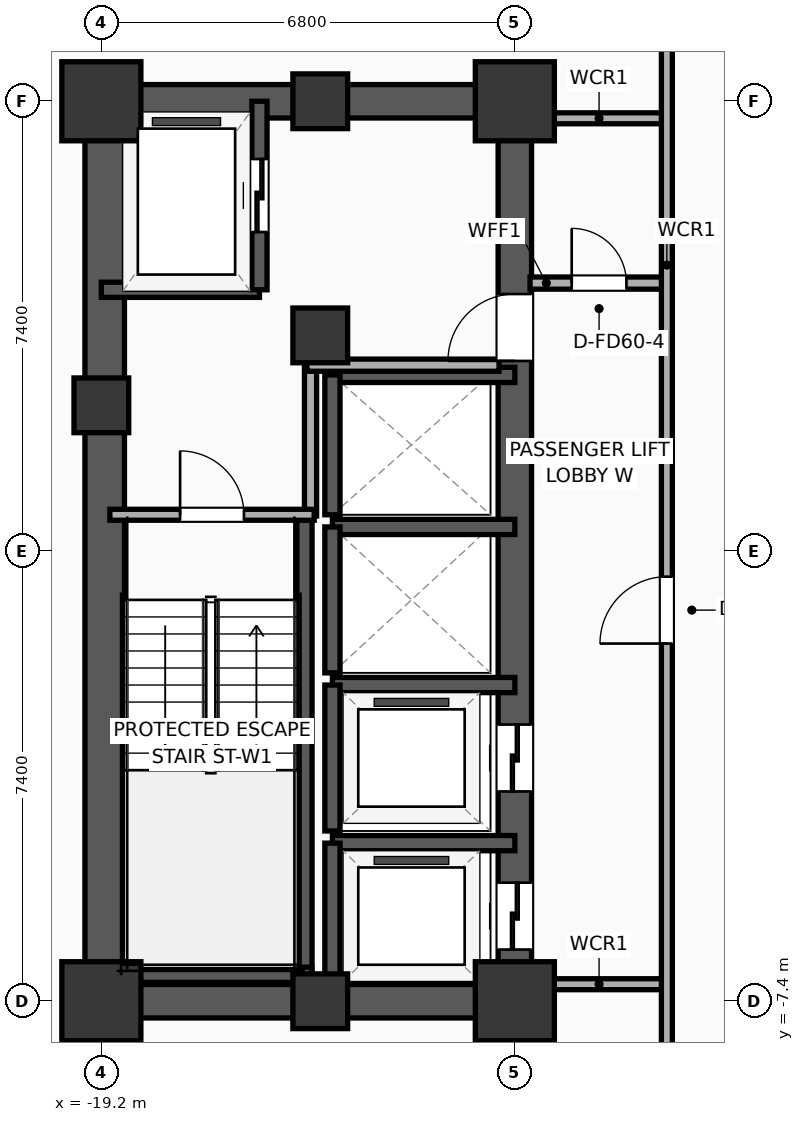
"""IFC4 building model, lengths in metres.
Left out: names, types, materials, properties, quantities, classifications, styles, units other than length and angle.
Written with IfcOpenShell. Run it as: python <this file> out.ifc"""

import sys

from ifc_helpers import new_model, si_unit, direction, frame, frame_2d, origin, origin_2d, place, context, subcontext, project, spatial, rectangle, extrude, element, fill, save


model = new_model("IFC4")
c1 = context("Model", 3, precision=1e-05, world=origin(), true_north=direction((0.0, 1.0)))
c2 = subcontext(c1, "Body", "Model", "MODEL_VIEW")
j1 = project(units=[si_unit("LENGTHUNIT", "METRE"), si_unit("PLANEANGLEUNIT", "RADIAN")], contexts=[c1])
p1 = place(None, origin())
s1 = spatial("IfcSite", under=j1, at=p1, CompositionType="ELEMENT")
p2 = place(p1, origin())
s2 = spatial("IfcBuilding", under=s1, at=p2, CompositionType="ELEMENT")
p3 = place(p2, frame((0.0, 0.0, 120.9)))
s3 = spatial("IfcBuildingStorey", under=s2, at=p3, CompositionType="ELEMENT", Elevation=120.9)
p4 = place(p3, frame((-19.2, -7.4, 0.0), z_axis=(0.0, 0.0, 1.0), x_axis=(1.0, 0.0, 0.0)))
e1 = element("IfcColumn", 1, at=p4, inside=s3, PredefinedType="COLUMN", context=c2, shape_type="SweptSolid", body=[
    extrude(rectangle(XDim=1.3, YDim=1.3, at=origin_2d()), origin(), (0.0, 0.0, 1.0), 3.9),
])
p5 = place(p3, frame((-19.2, 2.4, 0.0), z_axis=(0.0, 0.0, 1.0), x_axis=(1.0, 0.0, 0.0)))
e2 = element("IfcColumn", 2, at=p5, inside=s3, PredefinedType="COLUMN", context=c2, shape_type="SweptSolid", body=[
    extrude(rectangle(XDim=0.9, YDim=0.9, at=origin_2d()), origin(), (0.0, 0.0, 1.0), 3.9),
])
p6 = place(p3, frame((-19.2, 7.4, 0.0), z_axis=(0.0, 0.0, 1.0), x_axis=(1.0, 0.0, 0.0)))
e3 = element("IfcColumn", 3, at=p6, inside=s3, PredefinedType="COLUMN", context=c2, shape_type="SweptSolid", body=[
    extrude(rectangle(XDim=1.3, YDim=1.3, at=origin_2d()), origin(), (0.0, 0.0, 1.0), 3.9),
])
for number, where, z_axis, x_axis in (
    (4, (-15.6, -7.4, 0.0), (0.0, 0.0, 1.0), (1.0, 0.0, 0.0)),
    (5, (-15.6, 7.4, 0.0), (0.0, 0.0, 1.0), (1.0, 0.0, 0.0)),
):
    element("IfcColumn", number, at=place(p3, frame(where, z_axis=z_axis, x_axis=x_axis)), inside=s3, PredefinedType="COLUMN", context=c2, shape_type="SweptSolid", body=[
        extrude(rectangle(XDim=0.9, YDim=0.9, at=origin_2d()), origin(), (0.0, 0.0, 1.0), 3.9),
    ])
p7 = place(p3, frame((-12.4, -7.4, 0.0), z_axis=(0.0, 0.0, 1.0), x_axis=(1.0, 0.0, 0.0)))
e6 = element("IfcColumn", 6, at=p7, inside=s3, PredefinedType="COLUMN", context=c2, shape_type="SweptSolid", body=[
    extrude(rectangle(XDim=1.3, YDim=1.3, at=origin_2d()), origin(), (0.0, 0.0, 1.0), 3.9),
])
p8 = place(p3, frame((-15.6, 3.55, 0.0), z_axis=(0.0, 0.0, 1.0), x_axis=(1.0, 0.0, 0.0)))
e7 = element("IfcColumn", 7, at=p8, inside=s3, PredefinedType="COLUMN", context=c2, shape_type="SweptSolid", body=[
    extrude(rectangle(XDim=0.9, YDim=0.9, at=origin_2d()), origin(), (0.0, 0.0, 1.0), 3.9),
])
p9 = place(p3, frame((-12.4, 7.4, 0.0), z_axis=(0.0, 0.0, 1.0), x_axis=(1.0, 0.0, 0.0)))
e8 = element("IfcColumn", 8, at=p9, inside=s3, PredefinedType="COLUMN", context=c2, shape_type="SweptSolid", body=[
    extrude(rectangle(XDim=1.3, YDim=1.3, at=origin_2d()), origin(), (0.0, 0.0, 1.0), 3.9),
])
for number, where, z_axis, x_axis in (
    (9, (-19.475, -7.4, 0.0), (0.0, 0.0, 1.0), (1.0, 0.0, 0.0)),
    (10, (-19.475, 7.4, 0.0), (0.0, 0.0, 1.0), (1.0, 0.0, 0.0)),
):
    element("IfcWall", number, at=place(p3, frame(where, z_axis=z_axis, x_axis=x_axis)), inside=s3, PredefinedType="SHEAR", context=c2, shape_type="SweptSolid", body=[
        extrude(rectangle(XDim=7.35, YDim=0.55, at=frame_2d((3.675, 0.0))), origin(), (0.0, 0.0, 1.0), 3.65),
    ])
p10 = place(p3, frame((-19.145, -7.4, 0.0), z_axis=(0.0, 0.0, 1.0), x_axis=(0.0, 1.0, 0.0)))
e11 = element("IfcWall", 11, at=p10, inside=s3, PredefinedType="SHEAR", context=c2, shape_type="SweptSolid", body=[
    extrude(rectangle(XDim=14.8, YDim=0.65, at=frame_2d((7.4, 0.0))), origin(), (0.0, 0.0, 1.0), 3.65),
])
p11 = place(p3, frame((-12.4, -7.4, 0.0), z_axis=(0.0, 0.0, 1.0), x_axis=(0.0, 1.0, 0.0)))
e12 = element("IfcWall", 12, at=p11, inside=s3, PredefinedType="SHEAR", context=c2, shape_type="SweptSolid", body=[
    extrude(rectangle(XDim=14.8, YDim=0.55, at=frame_2d((7.4, 0.0))), origin(), (0.0, 0.0, 1.0), 3.65),
])
p12 = place(p11, frame((0.85, 0.0, 0.0)))
e13 = element("IfcOpeningElement", 13, at=p12, cuts=e12, PredefinedType="OPENING", context=c2, shape_type="SweptSolid", body=[
    extrude(rectangle(XDim=1.1, YDim=2.05, at=frame_2d((0.55, 1.025))), frame((0.0, 0.285, 0.0), z_axis=(0.0, -1.0, 0.0), x_axis=(1.0, 0.0, 0.0)), (0.0, 0.0, 1.0), 0.57),
])
p13 = place(p11, frame((3.45, 0.0, 0.0)))
e14 = element("IfcOpeningElement", 14, at=p13, cuts=e12, PredefinedType="OPENING", context=c2, shape_type="SweptSolid", body=[
    extrude(rectangle(XDim=1.1, YDim=2.05, at=frame_2d((0.55, 1.025))), frame((0.0, 0.285, 0.0), z_axis=(0.0, -1.0, 0.0), x_axis=(1.0, 0.0, 0.0)), (0.0, 0.0, 1.0), 0.57),
])
p14 = place(p11, frame((10.53, 0.0, 0.0)))
e15 = element("IfcOpeningElement", 15, at=p14, cuts=e12, PredefinedType="OPENING", context=c2, shape_type="SweptSolid", body=[
    extrude(rectangle(XDim=1.1, YDim=2.05, at=frame_2d((0.55, 1.025))), frame((0.0, 0.285, 0.0), z_axis=(0.0, -1.0, 0.0), x_axis=(1.0, 0.0, 0.0)), (0.0, 0.0, 1.0), 0.57),
])
p15 = place(p3, frame((-15.86, -7.085, 0.0), z_axis=(0.0, 0.0, 1.0), x_axis=(0.0, 1.0, 0.0)))
e16 = element("IfcWall", 16, at=p15, inside=s3, PredefinedType="SOLIDWALL", context=c2, shape_type="SweptSolid", body=[
    extrude(rectangle(XDim=7.685, YDim=0.25, at=frame_2d((3.843, 0.0))), origin(), (0.0, 0.0, 1.0), 3.65),
])
p16 = place(p3, frame((-19.2, -6.965, 0.0), z_axis=(0.0, 0.0, 1.0), x_axis=(1.0, 0.0, 0.0)))
e17 = element("IfcWall", 17, at=p16, inside=s3, PredefinedType="SOLIDWALL", context=c2, shape_type="SweptSolid", body=[
    extrude(rectangle(XDim=3.46, YDim=0.25, at=frame_2d((1.73, 0.0))), origin(), (0.0, 0.0, 1.0), 3.65),
])
p17 = place(p3, frame((-19.2, 4.3, 0.0), z_axis=(0.0, 0.0, 1.0), x_axis=(1.0, 0.0, 0.0)))
e18 = element("IfcWall", 18, at=p17, inside=s3, PredefinedType="SOLIDWALL", context=c2, shape_type="SweptSolid", body=[
    extrude(rectangle(XDim=2.6, YDim=0.25, at=frame_2d((1.3, 0.0))), origin(), (0.0, 0.0, 1.0), 3.65),
])
p18 = place(p3, frame((-16.6, 4.3, 0.0), z_axis=(0.0, 0.0, 1.0), x_axis=(0.0, 1.0, 0.0)))
e19 = element("IfcWall", 19, at=p18, inside=s3, PredefinedType="SOLIDWALL", context=c2, shape_type="SweptSolid", body=[
    extrude(rectangle(XDim=3.1, YDim=0.25, at=frame_2d((1.55, 0.0))), origin(), (0.0, 0.0, 1.0), 3.65),
])
p19 = place(p18, frame((0.95, 0.0, 0.0)))
e20 = element("IfcOpeningElement", 20, at=p19, cuts=e19, PredefinedType="OPENING", context=c2, shape_type="SweptSolid", body=[
    extrude(rectangle(XDim=1.2, YDim=2.05, at=frame_2d((0.6, 1.025))), frame((0.0, 0.135, 0.0), z_axis=(0.0, -1.0, 0.0), x_axis=(1.0, 0.0, 0.0)), (0.0, 0.0, 1.0), 0.27),
])
p20 = place(p3, frame((-12.4, -4.8, 0.0), z_axis=(0.0, 0.0, 1.0), x_axis=(-1.0, 0.0, 0.0)))
e21 = element("IfcWall", 21, at=p20, inside=s3, PredefinedType="SOLIDWALL", context=c2, shape_type="SweptSolid", body=[
    extrude(rectangle(XDim=3.0, YDim=0.25, at=frame_2d((1.5, 0.0))), origin(), (0.0, 0.0, 1.0), 3.65),
])
p21 = place(p3, frame((-15.4, -4.8, 0.0), z_axis=(0.0, 0.0, 1.0), x_axis=(0.0, -1.0, 0.0)))
e22 = element("IfcWall", 22, at=p21, inside=s3, PredefinedType="SOLIDWALL", context=c2, shape_type="SweptSolid", body=[
    extrude(rectangle(XDim=2.6, YDim=0.25, at=frame_2d((1.3, 0.0))), origin(), (0.0, 0.0, 1.0), 3.65),
])
p22 = place(p3, frame((-12.4, -2.2, 0.0), z_axis=(0.0, 0.0, 1.0), x_axis=(-1.0, 0.0, 0.0)))
e23 = element("IfcWall", 23, at=p22, inside=s3, PredefinedType="SOLIDWALL", context=c2, shape_type="SweptSolid", body=[
    extrude(rectangle(XDim=3.0, YDim=0.25, at=frame_2d((1.5, 0.0))), origin(), (0.0, 0.0, 1.0), 3.65),
])
p23 = place(p3, frame((-15.4, -2.2, 0.0), z_axis=(0.0, 0.0, 1.0), x_axis=(0.0, -1.0, 0.0)))
e24 = element("IfcWall", 24, at=p23, inside=s3, PredefinedType="SOLIDWALL", context=c2, shape_type="SweptSolid", body=[
    extrude(rectangle(XDim=2.4, YDim=0.25, at=frame_2d((1.2, 0.0))), origin(), (0.0, 0.0, 1.0), 3.65),
])
p24 = place(p3, frame((-12.4, 0.4, 0.0), z_axis=(0.0, 0.0, 1.0), x_axis=(-1.0, 0.0, 0.0)))
e25 = element("IfcWall", 25, at=p24, inside=s3, PredefinedType="SOLIDWALL", context=c2, shape_type="SweptSolid", body=[
    extrude(rectangle(XDim=3.0, YDim=0.25, at=frame_2d((1.5, 0.0))), origin(), (0.0, 0.0, 1.0), 3.65),
])
p25 = place(p3, frame((-15.4, 0.4, 0.0), z_axis=(0.0, 0.0, 1.0), x_axis=(0.0, -1.0, 0.0)))
e26 = element("IfcWall", 26, at=p25, inside=s3, PredefinedType="SOLIDWALL", context=c2, shape_type="SweptSolid", body=[
    extrude(rectangle(XDim=2.4, YDim=0.25, at=frame_2d((1.2, 0.0))), origin(), (0.0, 0.0, 1.0), 3.65),
])
p26 = place(p3, frame((-12.4, 2.9, 0.0), z_axis=(0.0, 0.0, 1.0), x_axis=(-1.0, 0.0, 0.0)))
e27 = element("IfcWall", 27, at=p26, inside=s3, PredefinedType="SOLIDWALL", context=c2, shape_type="SweptSolid", body=[
    extrude(rectangle(XDim=3.0, YDim=0.25, at=frame_2d((1.5, 0.0))), origin(), (0.0, 0.0, 1.0), 3.65),
])
p27 = place(p3, frame((-15.4, 2.9, 0.0), z_axis=(0.0, 0.0, 1.0), x_axis=(0.0, -1.0, 0.0)))
e28 = element("IfcWall", 28, at=p27, inside=s3, PredefinedType="SOLIDWALL", context=c2, shape_type="SweptSolid", body=[
    extrude(rectangle(XDim=2.3, YDim=0.25, at=frame_2d((1.15, 0.0))), origin(), (0.0, 0.0, 1.0), 3.65),
])
p28 = place(p3, frame((-15.76, 0.58, 0.0), z_axis=(0.0, 0.0, 1.0), x_axis=(0.0, 1.0, 0.0)))
e29 = element("IfcWall", 29, at=p28, inside=s3, PredefinedType="PARTITIONING", context=c2, shape_type="SweptSolid", body=[
    extrude(rectangle(XDim=2.52, YDim=0.2, at=frame_2d((1.26, 0.0))), origin(), (0.0, 0.0, 1.0), 3.65),
])
p29 = place(p3, frame((-15.82, 3.06, 0.0), z_axis=(0.0, 0.0, 1.0), x_axis=(1.0, 0.0, 0.0)))
e30 = element("IfcWall", 30, at=p29, inside=s3, PredefinedType="PARTITIONING", context=c2, shape_type="SweptSolid", body=[
    extrude(rectangle(XDim=3.16, YDim=0.2, at=frame_2d((1.58, 0.0))), origin(), (0.0, 0.0, 1.0), 3.65),
])
p30 = place(p3, frame((-19.06, 0.6, 0.0), z_axis=(0.0, 0.0, 1.0), x_axis=(1.0, 0.0, 0.0)))
e31 = element("IfcWall", 31, at=p30, inside=s3, PredefinedType="PARTITIONING", context=c2, shape_type="SweptSolid", body=[
    extrude(rectangle(XDim=3.36, YDim=0.18, at=frame_2d((1.68, 0.0))), origin(), (0.0, 0.0, 1.0), 3.65),
])
p31 = place(p30, frame((1.155, 0.0, 0.0)))
e32 = element("IfcOpeningElement", 32, at=p31, cuts=e31, PredefinedType="OPENING", context=c2, shape_type="SweptSolid", body=[
    extrude(rectangle(XDim=1.05, YDim=2.05, at=frame_2d((0.525, 1.025))), frame((0.0, 0.1, 0.0), z_axis=(0.0, -1.0, 0.0), x_axis=(1.0, 0.0, 0.0)), (0.0, 0.0, 1.0), 0.2),
])
p32 = place(p3, frame((-12.15, 4.41, 0.0), z_axis=(0.0, 0.0, 1.0), x_axis=(1.0, 0.0, 0.0)))
e33 = element("IfcWall", 33, at=p32, inside=s3, PredefinedType="PARTITIONING", context=c2, shape_type="SweptSolid", body=[
    extrude(rectangle(XDim=2.27, YDim=0.2, at=frame_2d((1.135, 0.0))), origin(), (0.0, 0.0, 1.0), 3.65),
])
p33 = place(p32, frame((0.685, 0.0, 0.0)))
e34 = element("IfcOpeningElement", 34, at=p33, cuts=e33, PredefinedType="OPENING", context=c2, shape_type="SweptSolid", body=[
    extrude(rectangle(XDim=0.9, YDim=2.05, at=frame_2d((0.45, 1.025))), frame((0.0, 0.11, 0.0), z_axis=(0.0, -1.0, 0.0), x_axis=(1.0, 0.0, 0.0)), (0.0, 0.0, 1.0), 0.22),
])
for number, where, z_axis, x_axis in (
    (35, (-12.15, 7.12, 0.0), (0.0, 0.0, 1.0), (1.0, 0.0, 0.0)),
    (36, (-12.15, -7.12, 0.0), (0.0, 0.0, 1.0), (1.0, 0.0, 0.0)),
):
    element("IfcWall", number, at=place(p3, frame(where, z_axis=z_axis, x_axis=x_axis)), inside=s3, PredefinedType="PARTITIONING", context=c2, shape_type="SweptSolid", body=[
        extrude(rectangle(XDim=2.27, YDim=0.18, at=frame_2d((1.135, 0.0))), origin(), (0.0, 0.0, 1.0), 3.65),
    ])
p34 = place(p3, frame((-9.9, -9.68, 0.0), z_axis=(0.0, 0.0, 1.0), x_axis=(0.0, 1.0, 0.0)))
e37 = element("IfcWall", 37, at=p34, inside=s3, PredefinedType="PARTITIONING", context=c2, shape_type="SweptSolid", body=[
    extrude(rectangle(XDim=19.36, YDim=0.18, at=frame_2d((9.68, 0.0))), origin(), (0.0, 0.0, 1.0), 3.65),
])
p35 = place(p34, frame((8.162, 0.0, 0.0)))
e38 = element("IfcOpeningElement", 38, at=p35, cuts=e37, PredefinedType="OPENING", context=c2, shape_type="SweptSolid", body=[
    extrude(rectangle(XDim=1.1, YDim=2.05, at=frame_2d((0.55, 1.025))), frame((0.0, 0.1, 0.0), z_axis=(0.0, -1.0, 0.0), x_axis=(1.0, 0.0, 0.0)), (0.0, 0.0, 1.0), 0.2),
])
p36 = place(p19, origin())
e39 = element("IfcDoor", 39, at=p36, inside=s3, OperationType="SLIDING_TO_LEFT", PredefinedType="DOOR", context=c2, shape_type="SweptSolid", body=[
    extrude(rectangle(XDim=1.2, YDim=2.05, at=frame_2d((0.6, 1.025))), frame((0.0, 0.025, 0.0), z_axis=(0.0, -1.0, 0.0), x_axis=(1.0, 0.0, 0.0)), (0.0, 0.0, 1.0), 0.05),
])
fill(e20, e39)
p37 = place(p12, origin())
e40 = element("IfcDoor", 40, at=p37, inside=s3, OperationType="SLIDING_TO_LEFT", PredefinedType="DOOR", context=c2, shape_type="SweptSolid", body=[
    extrude(rectangle(XDim=1.1, YDim=2.05, at=frame_2d((0.55, 1.025))), frame((0.0, 0.025, 0.0), z_axis=(0.0, -1.0, 0.0), x_axis=(1.0, 0.0, 0.0)), (0.0, 0.0, 1.0), 0.05),
])
fill(e13, e40)
p38 = place(p13, origin())
e41 = element("IfcDoor", 41, at=p38, inside=s3, OperationType="SLIDING_TO_LEFT", PredefinedType="DOOR", context=c2, shape_type="SweptSolid", body=[
    extrude(rectangle(XDim=1.1, YDim=2.05, at=frame_2d((0.55, 1.025))), frame((0.0, 0.025, 0.0), z_axis=(0.0, -1.0, 0.0), x_axis=(1.0, 0.0, 0.0)), (0.0, 0.0, 1.0), 0.05),
])
fill(e14, e41)
p39 = place(p31, origin())
e42 = element("IfcDoor", 42, at=p39, inside=s3, OperationType="SINGLE_SWING_LEFT", PredefinedType="DOOR", context=c2, shape_type="SweptSolid", body=[
    extrude(rectangle(XDim=1.05, YDim=2.05, at=frame_2d((0.525, 1.025))), frame((0.0, 0.025, 0.0), z_axis=(0.0, -1.0, 0.0), x_axis=(1.0, 0.0, 0.0)), (0.0, 0.0, 1.0), 0.05),
])
fill(e32, e42)
p40 = place(p33, origin())
e43 = element("IfcDoor", 43, at=p40, inside=s3, OperationType="SINGLE_SWING_LEFT", PredefinedType="DOOR", context=c2, shape_type="SweptSolid", body=[
    extrude(rectangle(XDim=0.9, YDim=2.05, at=frame_2d((0.45, 1.025))), frame((0.0, 0.025, 0.0), z_axis=(0.0, -1.0, 0.0), x_axis=(1.0, 0.0, 0.0)), (0.0, 0.0, 1.0), 0.05),
])
fill(e34, e43)
p41 = place(p35, origin())
e44 = element("IfcDoor", 44, at=p41, inside=s3, OperationType="SINGLE_SWING_LEFT", PredefinedType="DOOR", context=c2, shape_type="SweptSolid", body=[
    extrude(rectangle(XDim=1.1, YDim=2.05, at=frame_2d((0.55, 1.025))), frame((0.0, 0.025, 0.0), z_axis=(0.0, -1.0, 0.0), x_axis=(1.0, 0.0, 0.0)), (0.0, 0.0, 1.0), 0.05),
])
fill(e38, e44)
p42 = place(p14, origin())
e45 = element("IfcDoor", 45, at=p42, inside=s3, OperationType="SINGLE_SWING_LEFT", PredefinedType="DOOR", context=c2, shape_type="SweptSolid", body=[
    extrude(rectangle(XDim=1.1, YDim=2.05, at=frame_2d((0.55, 1.025))), frame((0.0, 0.025, 0.0), z_axis=(0.0, -1.0, 0.0), x_axis=(1.0, 0.0, 0.0)), (0.0, 0.0, 1.0), 0.05),
])
fill(e15, e45)
save(model, sys.argv[1])
